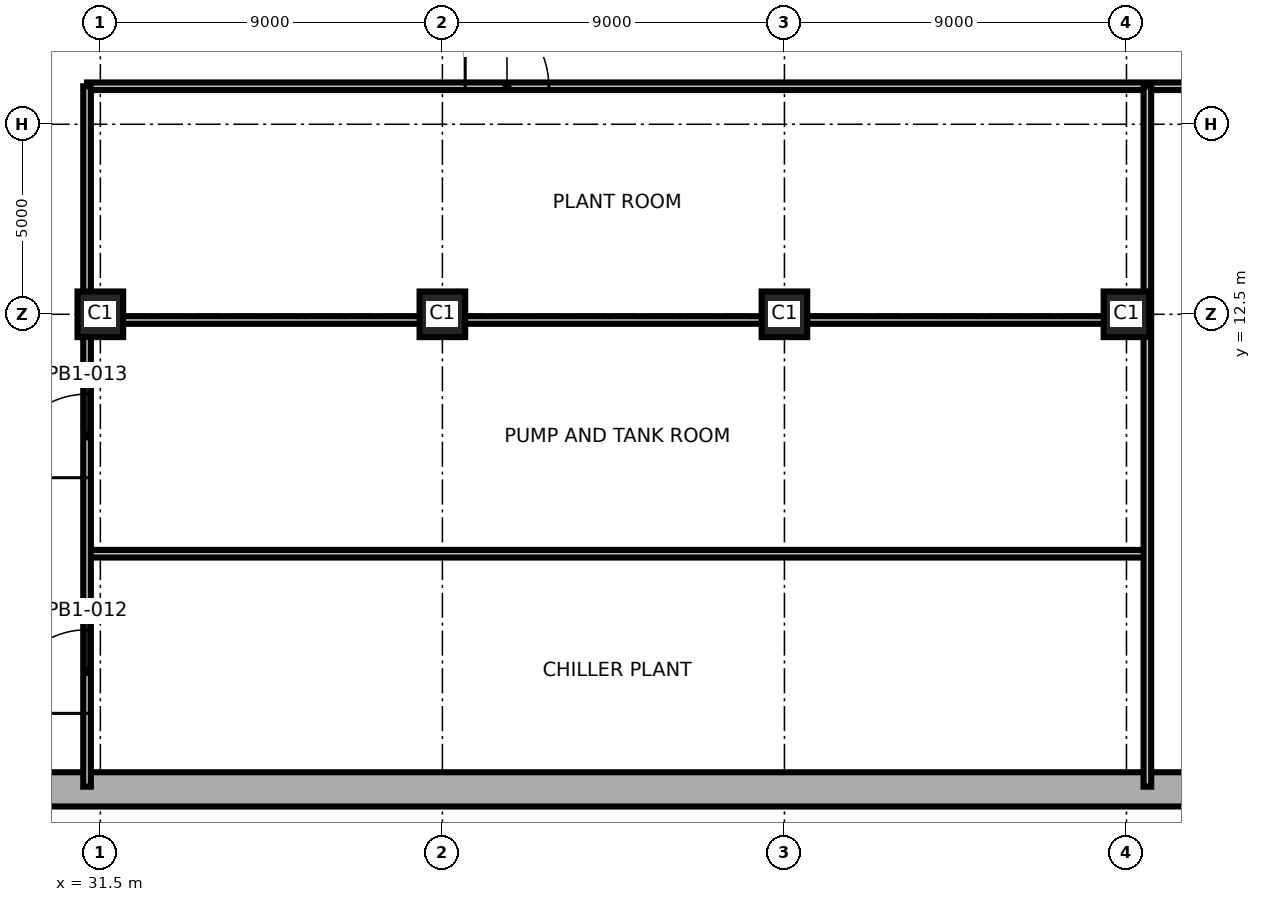
"""IFC4 building model, lengths in metres.
Left out: names, types, materials, properties, quantities, classifications, styles, units other than length and angle.
Written with IfcOpenShell. Run it as: python <this file> out.ifc"""

import sys

from ifc_helpers import new_model, si_unit, direction, frame, frame_2d, origin, origin_2d, place, context, subcontext, project, spatial, rectangle, extrude, element, fill, save


model = new_model("IFC4")
c1 = context("Model", 3, precision=1e-05, world=origin(), true_north=direction((0.0, 1.0)))
c2 = subcontext(c1, "Body", "Model", "MODEL_VIEW")
j1 = project(units=[si_unit("LENGTHUNIT", "METRE"), si_unit("PLANEANGLEUNIT", "RADIAN")], contexts=[c1])
p1 = place(None, origin())
s1 = spatial("IfcSite", under=j1, at=p1, CompositionType="ELEMENT")
p2 = place(p1, origin())
s2 = spatial("IfcBuilding", under=s1, at=p2, CompositionType="ELEMENT")
p3 = place(p2, frame((0.0, 0.0, -4.5)))
s3 = spatial("IfcBuildingStorey", under=s2, at=p3, CompositionType="ELEMENT", Elevation=-4.5)
for number, where, z_axis, x_axis in (
    (1, (31.5, 12.5, 0.0), (0.0, 0.0, 1.0), (1.0, 0.0, 0.0)),
    (2, (40.5, 12.5, 0.0), (0.0, 0.0, 1.0), (1.0, 0.0, 0.0)),
    (3, (49.5, 12.5, 0.0), (0.0, 0.0, 1.0), (1.0, 0.0, 0.0)),
    (4, (58.5, 12.5, 0.0), (0.0, 0.0, 1.0), (1.0, 0.0, 0.0)),
):
    element("IfcColumn", number, at=place(p3, frame(where, z_axis=z_axis, x_axis=x_axis)), inside=s3, PredefinedType="COLUMN", context=c2, shape_type="SweptSolid", body=[
        extrude(rectangle(XDim=1.2, YDim=1.2, at=origin_2d()), origin(), (0.0, 0.0, 1.0), 4.5),
    ])
p4 = place(p3, frame((20.55, 0.0, 0.0), z_axis=(0.0, 0.0, 1.0), x_axis=(1.0, 0.0, 0.0)))
e5 = element("IfcWall", 5, at=p4, inside=s3, PredefinedType="SOLIDWALL", context=c2, shape_type="SweptSolid", body=[
    extrude(rectangle(XDim=84.9, YDim=0.9, at=frame_2d((42.45, 0.0))), origin(), (0.0, 0.0, 1.0), 4.5),
])
p5 = place(p3, frame((31.15, 12.35, 0.0), z_axis=(0.0, 0.0, 1.0), x_axis=(1.0, 0.0, 0.0)))
e6 = element("IfcWall", 6, at=p5, inside=s3, PredefinedType="PARTITIONING", context=c2, shape_type="SweptSolid", body=[
    extrude(rectangle(XDim=27.9, YDim=0.2, at=frame_2d((13.95, 0.0))), origin(), (0.0, 0.0, 1.0), 4.2),
])
p6 = place(p3, frame((31.15, 18.5, 0.0), z_axis=(0.0, 0.0, 1.0), x_axis=(1.0, 0.0, 0.0)))
e7 = element("IfcWall", 7, at=p6, inside=s3, PredefinedType="PARTITIONING", context=c2, shape_type="SweptSolid", body=[
    extrude(rectangle(XDim=30.35, YDim=0.2, at=frame_2d((15.175, 0.0))), origin(), (0.0, 0.0, 1.0), 4.2),
])
p7 = place(p6, frame((9.95, 0.0, 0.0)))
e8 = element("IfcOpeningElement", 8, at=p7, cuts=e7, PredefinedType="OPENING", context=c2, shape_type="SweptSolid", body=[
    extrude(rectangle(XDim=2.2, YDim=2.4, at=frame_2d((1.1, 1.2))), frame((0.0, 0.11, 0.0), z_axis=(0.0, -1.0, 0.0), x_axis=(1.0, 0.0, 0.0)), (0.0, 0.0, 1.0), 0.22),
])
p8 = place(p3, frame((31.15, 6.2, 0.0), z_axis=(0.0, 0.0, 1.0), x_axis=(1.0, 0.0, 0.0)))
e9 = element("IfcWall", 9, at=p8, inside=s3, PredefinedType="PARTITIONING", context=c2, shape_type="SweptSolid", body=[
    extrude(rectangle(XDim=27.9, YDim=0.2, at=frame_2d((13.95, 0.0))), origin(), (0.0, 0.0, 1.0), 3.8),
])
p9 = place(p3, frame((31.15, 0.07, 0.0), z_axis=(0.0, 0.0, 1.0), x_axis=(0.0, 1.0, 0.0)))
e10 = element("IfcWall", 10, at=p9, inside=s3, PredefinedType="PARTITIONING", context=c2, shape_type="SweptSolid", body=[
    extrude(rectangle(XDim=18.43, YDim=0.2, at=frame_2d((9.215, 0.0))), origin(), (0.0, 0.0, 1.0), 3.8),
])
p10 = place(p9, frame((1.93, 0.0, 0.0)))
e11 = element("IfcOpeningElement", 11, at=p10, cuts=e10, PredefinedType="OPENING", context=c2, shape_type="SweptSolid", body=[
    extrude(rectangle(XDim=2.2, YDim=2.4, at=frame_2d((1.1, 1.2))), frame((0.0, 0.11, 0.0), z_axis=(0.0, -1.0, 0.0), x_axis=(1.0, 0.0, 0.0)), (0.0, 0.0, 1.0), 0.22),
])
p11 = place(p9, frame((8.13, 0.0, 0.0)))
e12 = element("IfcOpeningElement", 12, at=p11, cuts=e10, PredefinedType="OPENING", context=c2, shape_type="SweptSolid", body=[
    extrude(rectangle(XDim=2.2, YDim=2.4, at=frame_2d((1.1, 1.2))), frame((0.0, 0.11, 0.0), z_axis=(0.0, -1.0, 0.0), x_axis=(1.0, 0.0, 0.0)), (0.0, 0.0, 1.0), 0.22),
])
p12 = place(p3, frame((59.05, 0.07, 0.0), z_axis=(0.0, 0.0, 1.0), x_axis=(0.0, 1.0, 0.0)))
e13 = element("IfcWall", 13, at=p12, inside=s3, PredefinedType="PARTITIONING", context=c2, shape_type="SweptSolid", body=[
    extrude(rectangle(XDim=18.43, YDim=0.2, at=frame_2d((9.215, 0.0))), origin(), (0.0, 0.0, 1.0), 3.8),
])
p13 = place(p10, origin())
e14 = element("IfcDoor", 14, at=p13, inside=s3, OperationType="SINGLE_SWING_RIGHT", PredefinedType="DOOR", context=c2, shape_type="SweptSolid", body=[
    extrude(rectangle(XDim=2.2, YDim=2.4, at=frame_2d((1.1, 1.2))), frame((0.0, 0.025, 0.0), z_axis=(0.0, -1.0, 0.0), x_axis=(1.0, 0.0, 0.0)), (0.0, 0.0, 1.0), 0.05),
])
fill(e11, e14)
p14 = place(p11, origin())
e15 = element("IfcDoor", 15, at=p14, inside=s3, OperationType="SINGLE_SWING_LEFT", PredefinedType="DOOR", context=c2, shape_type="SweptSolid", body=[
    extrude(rectangle(XDim=2.2, YDim=2.4, at=frame_2d((1.1, 1.2))), frame((0.0, 0.025, 0.0), z_axis=(0.0, -1.0, 0.0), x_axis=(1.0, 0.0, 0.0)), (0.0, 0.0, 1.0), 0.05),
])
fill(e12, e15)
p15 = place(p7, origin())
e16 = element("IfcDoor", 16, at=p15, inside=s3, OperationType="SINGLE_SWING_RIGHT", PredefinedType="DOOR", context=c2, shape_type="SweptSolid", body=[
    extrude(rectangle(XDim=2.2, YDim=2.4, at=frame_2d((1.1, 1.2))), frame((0.0, 0.025, 0.0), z_axis=(0.0, -1.0, 0.0), x_axis=(1.0, 0.0, 0.0)), (0.0, 0.0, 1.0), 0.05),
])
fill(e8, e16)
save(model, sys.argv[1])
